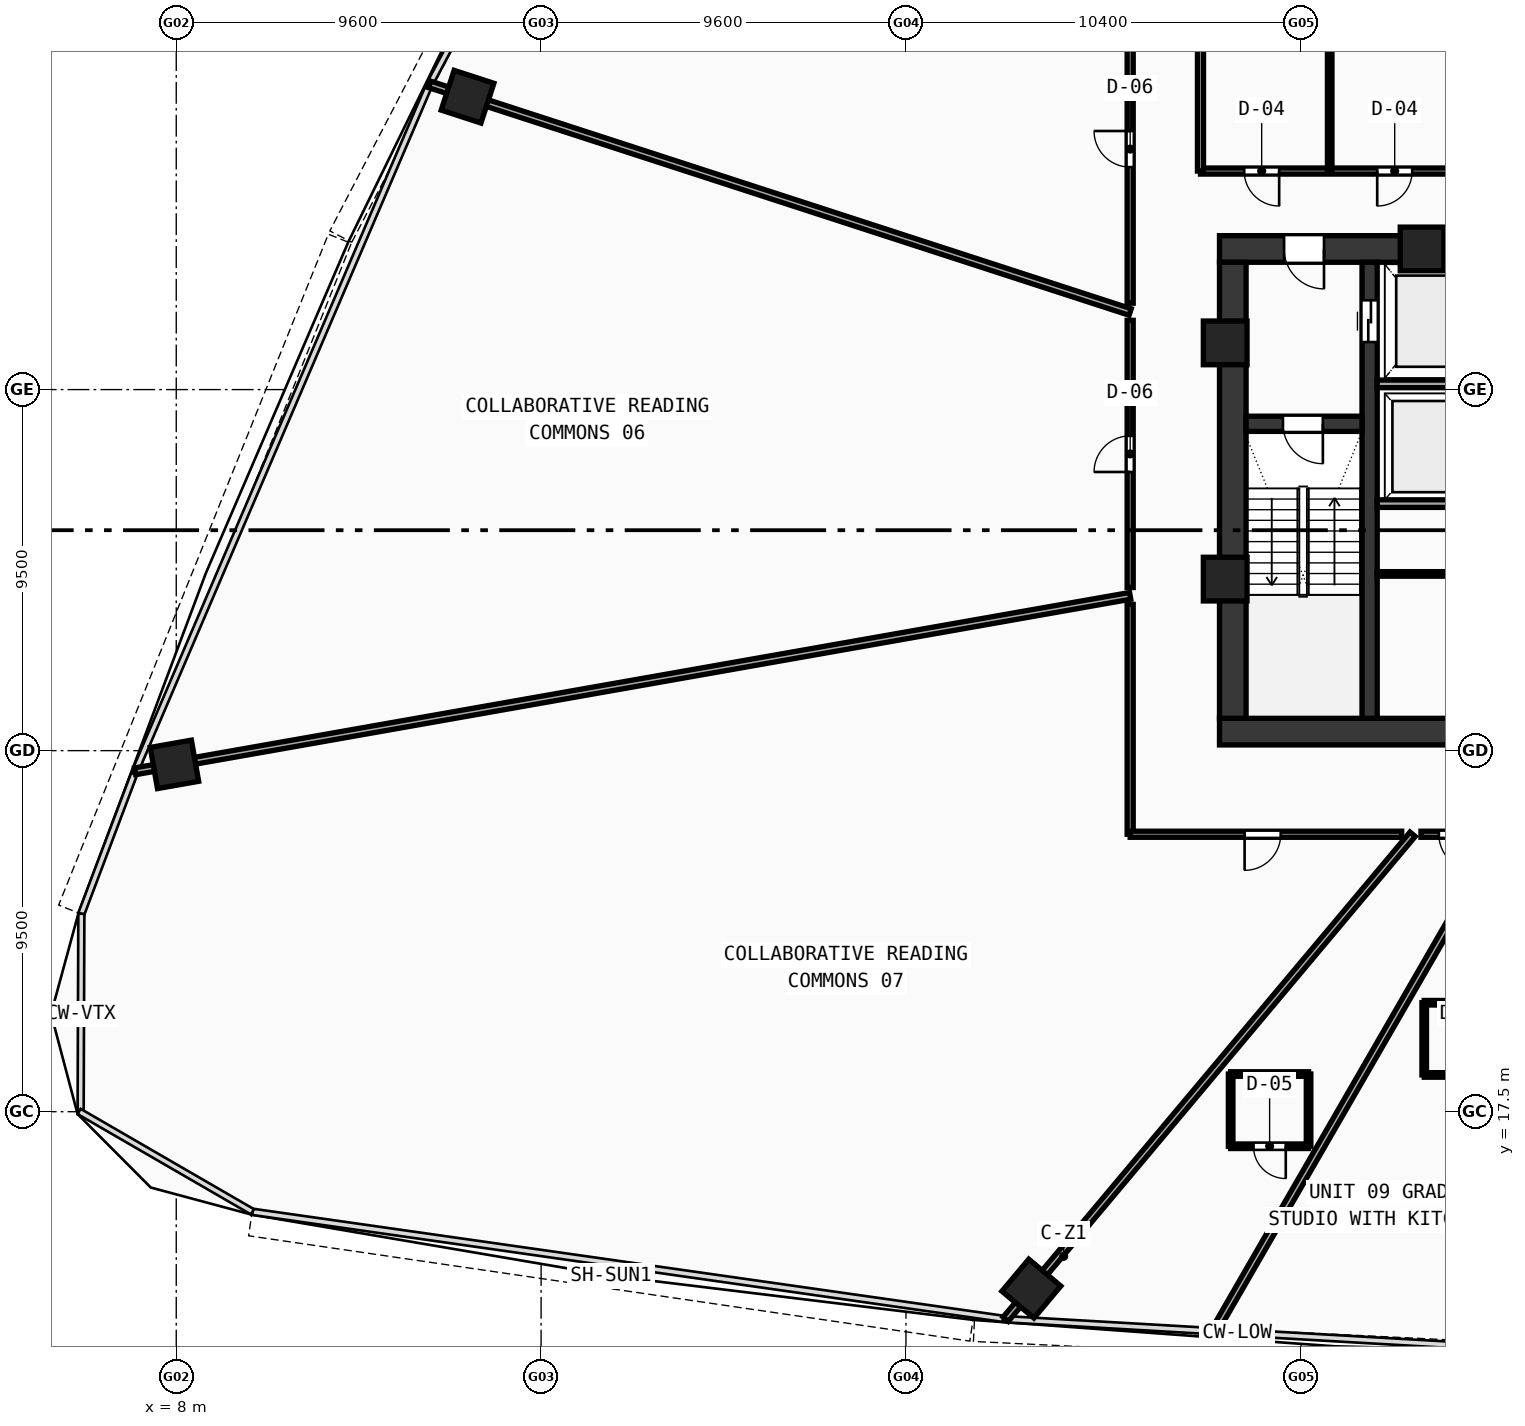
"""IFC4 building model, lengths in metres.
Left out: names, types, materials, properties, quantities, classifications, styles, units other than length and angle.
Written with IfcOpenShell. Run it as: python <this file> out.ifc"""

import sys

from ifc_helpers import new_model, si_unit, direction, frame, frame_2d, origin, origin_with_axes, origin_2d, place, context, subcontext, project, spatial, rectangle, hollow_rectangle, extrude, source, transform, mapped, element, fill, save


model = new_model("IFC4")
c1 = context("Model", 3, precision=1e-05, world=origin(), true_north=direction((0.0, 1.0)))
c2 = subcontext(c1, "Body", "Model", "MODEL_VIEW")
j1 = project(units=[si_unit("LENGTHUNIT", "METRE"), si_unit("PLANEANGLEUNIT", "RADIAN")], contexts=[c1])
p1 = place(None, origin())
s1 = spatial("IfcSite", under=j1, at=p1, CompositionType="ELEMENT")
p2 = place(p1, origin())
s2 = spatial("IfcBuilding", under=s1, at=p2, CompositionType="ELEMENT")
p3 = place(p2, frame((0.0, 0.0, 63.07)))
s3 = spatial("IfcBuildingStorey", under=s2, at=p3, CompositionType="ELEMENT", Elevation=63.07)
p4 = place(p3, frame((35.45, 27.5, 0.0), z_axis=(0.0, 0.0, 1.0), x_axis=(1.0, 0.0, 0.0)))
e1 = element("IfcWall", 1, at=p4, inside=s3, PredefinedType="SHEAR", context=c2, shape_type="SweptSolid", body=[
    extrude(rectangle(XDim=25.1, YDim=0.7, at=frame_2d((12.55, 0.0))), origin(), (0.0, 0.0, 1.0), 3.37),
])
p5 = place(p3, frame((35.45, 40.2, 0.0), z_axis=(0.0, 0.0, 1.0), x_axis=(1.0, 0.0, 0.0)))
e2 = element("IfcWall", 2, at=p5, inside=s3, PredefinedType="SHEAR", context=c2, shape_type="SweptSolid", body=[
    extrude(rectangle(XDim=11.35, YDim=0.7, at=frame_2d((5.675, 0.0))), origin(), (0.0, 0.0, 1.0), 3.37),
])
p6 = place(p5, frame((1.7, 0.0, 0.0)))
e3 = element("IfcOpeningElement", 3, at=p6, cuts=e2, PredefinedType="OPENING", context=c2, shape_type="SweptSolid", body=[
    extrude(rectangle(XDim=1.05, YDim=2.1, at=frame_2d((0.525, 1.05))), frame((0.0, 0.36, 0.0), z_axis=(0.0, -1.0, 0.0), x_axis=(1.0, 0.0, 0.0)), (0.0, 0.0, 1.0), 0.72),
])
p7 = place(p3, frame((35.8, 27.85, 0.0), z_axis=(0.0, 0.0, 1.0), x_axis=(0.0, 1.0, 0.0)))
e4 = element("IfcWall", 4, at=p7, inside=s3, PredefinedType="SHEAR", context=c2, shape_type="SweptSolid", body=[
    extrude(rectangle(XDim=12.0, YDim=0.7, at=frame_2d((6.0, 0.0))), origin(), (0.0, 0.0, 1.0), 3.37),
])
p8 = place(p3, frame((39.4, 27.85, 0.0), z_axis=(0.0, 0.0, 1.0), x_axis=(0.0, 1.0, 0.0)))
e5 = element("IfcWall", 5, at=p8, inside=s3, PredefinedType="SHEAR", context=c2, shape_type="SweptSolid", body=[
    extrude(rectangle(XDim=12.0, YDim=0.4, at=frame_2d((6.0, 0.0))), origin(), (0.0, 0.0, 1.0), 3.37),
])
p9 = place(p8, frame((9.9, 0.0, 0.0)))
e6 = element("IfcOpeningElement", 6, at=p9, cuts=e5, PredefinedType="OPENING", context=c2, shape_type="SweptSolid", body=[
    extrude(rectangle(XDim=1.1, YDim=2.1, at=frame_2d((0.55, 1.05))), frame((0.0, 0.21, 0.0), z_axis=(0.0, -1.0, 0.0), x_axis=(1.0, 0.0, 0.0)), (0.0, 0.0, 1.0), 0.42),
])
p10 = place(p3, frame((36.15, 35.6, 0.0), z_axis=(0.0, 0.0, 1.0), x_axis=(1.0, 0.0, 0.0)))
e7 = element("IfcWall", 7, at=p10, inside=s3, PredefinedType="SHEAR", context=c2, shape_type="SweptSolid", body=[
    extrude(rectangle(XDim=3.05, YDim=0.4, at=frame_2d((1.525, 0.0))), origin(), (0.0, 0.0, 1.0), 3.37),
])
p11 = place(p10, frame((0.97, 0.0, 0.0)))
e8 = element("IfcOpeningElement", 8, at=p11, cuts=e7, PredefinedType="OPENING", context=c2, shape_type="SweptSolid", body=[
    extrude(rectangle(XDim=1.05, YDim=2.1, at=frame_2d((0.525, 1.05))), frame((0.0, 0.21, 0.0), z_axis=(0.0, -1.0, 0.0), x_axis=(1.0, 0.0, 0.0)), (0.0, 0.0, 1.0), 0.42),
])
m1 = source(origin(), c2, "Body", "SweptSolid", [
    extrude(hollow_rectangle(XDim=1.15, YDim=1.15, WallThickness=0.048, at=origin_2d()), origin(), (0.0, 0.0, 1.0), 3.63),
])
for number, where, z_axis, x_axis in (
    (9, (40.781, 40.2, -0.26), (0.0, 0.0, 1.0), (1.0, 0.0, 0.0)),
    (10, (35.6, 37.729, -0.26), (0.0, 0.0, 1.0), (1.0, 0.0, 0.0)),
    (11, (35.6, 31.513, -0.26), (0.0, 0.0, 1.0), (1.0, 0.0, 0.0)),
):
    element("IfcColumn", number, at=place(p3, frame(where, z_axis=z_axis, x_axis=x_axis)), inside=s3, PredefinedType="COLUMN", context=c2, shape_type="MappedRepresentation", body=[
        mapped(m1, transform((0.0, 0.0, 0.0), scale=1.0)),
    ])
m2 = source(origin(), c2, "Body", "SweptSolid", [
    extrude(hollow_rectangle(XDim=1.1, YDim=1.1, WallThickness=0.045, at=origin_2d()), origin(), (0.0, 0.0, 1.0), 3.63),
])
for number, where, z_axis, x_axis in (
    (12, (30.5, 12.844, -0.26), (0.0, 0.0, 1.0), (0.766, -0.643, 0.0)),
    (13, (15.665, 44.206, -0.26), (0.0, 0.0, 1.0), (-0.309, -0.951, 0.0)),
    (14, (7.952, 26.638, -0.26), (0.0, 0.0, 1.0), (0.174, -0.985, 0.0)),
):
    element("IfcColumn", number, at=place(p3, frame(where, z_axis=z_axis, x_axis=x_axis)), inside=s3, PredefinedType="COLUMN", context=c2, shape_type="MappedRepresentation", body=[
        mapped(m2, transform((0.0, 0.0, 0.0), scale=1.0)),
    ])
for number, where, z_axis, x_axis in (
    (15, (39.6, 36.65, 0.0), (0.0, 0.0, 1.0), (1.0, 0.0, 0.0)),
    (16, (39.6, 33.5, 0.0), (0.0, 0.0, 1.0), (1.0, 0.0, 0.0)),
):
    element("IfcWall", number, at=place(p3, frame(where, z_axis=z_axis, x_axis=x_axis)), inside=s3, PredefinedType="SOLIDWALL", context=c2, shape_type="SweptSolid", body=[
        extrude(rectangle(XDim=2.72, YDim=0.2, at=frame_2d((1.36, 0.0))), origin(), (0.0, 0.0, 1.0), 3.37),
    ])
p12 = place(p3, frame((39.6, 31.65, 0.0), z_axis=(0.0, 0.0, 1.0), x_axis=(1.0, 0.0, 0.0)))
e17 = element("IfcWall", 17, at=p12, inside=s3, PredefinedType="PARTITIONING", context=c2, shape_type="SweptSolid", body=[
    extrude(rectangle(XDim=2.72, YDim=0.12, at=frame_2d((1.36, 0.0))), origin(), (0.0, 0.0, 1.0), 3.37),
])
p13 = place(p3, frame((34.95, 42.25, 0.0), z_axis=(0.0, 0.0, 1.0), x_axis=(1.0, 0.0, 0.0)))
e18 = element("IfcWall", 18, at=p13, inside=s3, PredefinedType="PARTITIONING", context=c2, shape_type="SweptSolid", body=[
    extrude(rectangle(XDim=8.93, YDim=0.16, at=frame_2d((4.465, 0.0))), origin(), (0.0, 0.0, 1.0), 2.67),
])
p14 = place(p13, frame((1.15, 0.0, 0.0)))
e19 = element("IfcOpeningElement", 19, at=p14, cuts=e18, PredefinedType="OPENING", context=c2, shape_type="SweptSolid", body=[
    extrude(rectangle(XDim=0.92, YDim=2.1, at=frame_2d((0.46, 1.05))), frame((0.0, 0.09, 0.0), z_axis=(0.0, -1.0, 0.0), x_axis=(1.0, 0.0, 0.0)), (0.0, 0.0, 1.0), 0.18),
])
p15 = place(p13, frame((4.65, 0.0, 0.0)))
e20 = element("IfcOpeningElement", 20, at=p15, cuts=e18, PredefinedType="OPENING", context=c2, shape_type="SweptSolid", body=[
    extrude(rectangle(XDim=0.92, YDim=2.1, at=frame_2d((0.46, 1.05))), frame((0.0, 0.09, 0.0), z_axis=(0.0, -1.0, 0.0), x_axis=(1.0, 0.0, 0.0)), (0.0, 0.0, 1.0), 0.18),
])
p16 = place(p3, frame((34.95, 42.25, 0.0), z_axis=(0.0, 0.0, 1.0), x_axis=(0.0, 1.0, 0.0)))
e21 = element("IfcWall", 21, at=p16, inside=s3, PredefinedType="PARTITIONING", context=c2, shape_type="SweptSolid", body=[
    extrude(rectangle(XDim=11.7, YDim=0.16, at=frame_2d((5.85, 0.0))), origin(), (0.0, 0.0, 1.0), 2.67),
])
p17 = place(p3, frame((38.35, 42.25, 0.0), z_axis=(0.0, 0.0, 1.0), x_axis=(0.0, 1.0, 0.0)))
e22 = element("IfcWall", 22, at=p17, inside=s3, PredefinedType="PARTITIONING", context=c2, shape_type="SweptSolid", body=[
    extrude(rectangle(XDim=11.7, YDim=0.12, at=frame_2d((5.85, 0.0))), origin(), (0.0, 0.0, 1.0), 2.67),
])
p18 = place(p3, frame((33.1, 38.541, 0.0), z_axis=(0.0, 0.0, 1.0), x_axis=(-0.951054245528, 0.309023982992, 0.0)))
e23 = element("IfcWall", 23, at=p18, inside=s3, PredefinedType="PARTITIONING", context=c2, shape_type="SweptSolid", body=[
    extrude(rectangle(XDim=19.383, YDim=0.18, at=frame_2d((9.691, 0.0))), origin(), (0.0, 0.0, 1.0), 2.67),
])
p19 = place(p3, frame((33.1, 31.073, 0.0), z_axis=(0.0, 0.0, 1.0), x_axis=(-0.984808509529, -0.173643887195, 0.0)))
e24 = element("IfcWall", 24, at=p19, inside=s3, PredefinedType="PARTITIONING", context=c2, shape_type="SweptSolid", body=[
    extrude(rectangle(XDim=26.586, YDim=0.18, at=frame_2d((13.293, 0.0))), origin(), (0.0, 0.0, 1.0), 2.67),
])
p20 = place(p3, frame((40.532, 24.8, 0.0), z_axis=(0.0, 0.0, 1.0), x_axis=(-0.642782945965, -0.766048356422, 0.0)))
e25 = element("IfcWall", 25, at=p20, inside=s3, PredefinedType="PARTITIONING", context=c2, shape_type="SweptSolid", body=[
    extrude(rectangle(XDim=16.657, YDim=0.18, at=frame_2d((8.329, 0.0))), origin(), (0.0, 0.0, 1.0), 2.67),
])
p21 = place(p3, frame((42.862, 24.8, 0.0), z_axis=(0.0, 0.0, 1.0), x_axis=(-0.499994448746, -0.866028608779, 0.0)))
e26 = element("IfcWall", 26, at=p21, inside=s3, PredefinedType="PARTITIONING", context=c2, shape_type="SweptSolid", body=[
    extrude(rectangle(XDim=15.099, YDim=0.18, at=frame_2d((7.55, 0.0))), origin(), (0.0, 0.0, 1.0), 2.67),
])
p22 = place(p3, frame((33.1, 24.8, 0.0), z_axis=(0.0, 0.0, 1.0), x_axis=(0.0, 1.0, 0.0)))
e27 = element("IfcWall", 27, at=p22, inside=s3, PredefinedType="PARTITIONING", context=c2, shape_type="SweptSolid", body=[
    extrude(rectangle(XDim=6.049, YDim=0.16, at=frame_2d((3.025, 0.0))), origin(), (0.0, 0.0, 1.0), 2.97),
])
p23 = place(p3, frame((33.1, 31.292, 0.0), z_axis=(0.0, 0.0, 1.0), x_axis=(0.0, 1.0, 0.0)))
e28 = element("IfcWall", 28, at=p23, inside=s3, PredefinedType="PARTITIONING", context=c2, shape_type="SweptSolid", body=[
    extrude(rectangle(XDim=7.029, YDim=0.16, at=frame_2d((3.515, 0.0))), origin(), (0.0, 0.0, 1.0), 3.37),
])
p24 = place(p23, frame((3.04, 0.0, 0.0)))
e29 = element("IfcOpeningElement", 29, at=p24, cuts=e28, PredefinedType="OPENING", context=c2, shape_type="SweptSolid", body=[
    extrude(rectangle(XDim=0.95, YDim=2.1, at=frame_2d((0.475, 1.05))), frame((0.0, 0.09, 0.0), z_axis=(0.0, -1.0, 0.0), x_axis=(1.0, 0.0, 0.0)), (0.0, 0.0, 1.0), 0.18),
])
p25 = place(p3, frame((33.1, 38.773, 0.0), z_axis=(0.0, 0.0, 1.0), x_axis=(0.0, 1.0, 0.0)))
e30 = element("IfcWall", 30, at=p25, inside=s3, PredefinedType="PARTITIONING", context=c2, shape_type="SweptSolid", body=[
    extrude(rectangle(XDim=8.124, YDim=0.16, at=frame_2d((4.062, 0.0))), origin(), (0.0, 0.0, 1.0), 2.67),
])
p26 = place(p25, frame((3.581, 0.0, 0.0)))
e31 = element("IfcOpeningElement", 31, at=p26, cuts=e30, PredefinedType="OPENING", context=c2, shape_type="SweptSolid", body=[
    extrude(rectangle(XDim=0.95, YDim=2.1, at=frame_2d((0.475, 1.05))), frame((0.0, 0.09, 0.0), z_axis=(0.0, -1.0, 0.0), x_axis=(1.0, 0.0, 0.0)), (0.0, 0.0, 1.0), 0.18),
])
p27 = place(p3, frame((42.608, 24.8, 0.0), z_axis=(0.0, 0.0, 1.0), x_axis=(-1.0, 0.0, 0.0)))
e32 = element("IfcWall", 32, at=p27, inside=s3, PredefinedType="PARTITIONING", context=c2, shape_type="SweptSolid", body=[
    extrude(rectangle(XDim=1.856, YDim=0.16, at=frame_2d((0.928, 0.0))), origin(), (0.0, 0.0, 1.0), 2.67),
])
p28 = place(p27, frame((0.436, 0.0, 0.0)))
e33 = element("IfcOpeningElement", 33, at=p28, cuts=e32, PredefinedType="OPENING", context=c2, shape_type="SweptSolid", body=[
    extrude(rectangle(XDim=0.95, YDim=2.1, at=frame_2d((0.475, 1.05))), frame((0.0, 0.09, 0.0), z_axis=(0.0, -1.0, 0.0), x_axis=(1.0, 0.0, 0.0)), (0.0, 0.0, 1.0), 0.18),
])
p29 = place(p3, frame((40.245, 24.8, 0.0), z_axis=(0.0, 0.0, 1.0), x_axis=(-1.0, 0.0, 0.0)))
e34 = element("IfcWall", 34, at=p29, inside=s3, PredefinedType="PARTITIONING", context=c2, shape_type="SweptSolid", body=[
    extrude(rectangle(XDim=7.145, YDim=0.16, at=frame_2d((3.572, 0.0))), origin(), (0.0, 0.0, 1.0), 2.97),
])
p30 = place(p29, frame((3.184, 0.0, 0.0)))
e35 = element("IfcOpeningElement", 35, at=p30, cuts=e34, PredefinedType="OPENING", context=c2, shape_type="SweptSolid", body=[
    extrude(rectangle(XDim=0.95, YDim=2.1, at=frame_2d((0.475, 1.05))), frame((0.0, 0.09, 0.0), z_axis=(0.0, -1.0, 0.0), x_axis=(1.0, 0.0, 0.0)), (0.0, 0.0, 1.0), 0.18),
])
p31 = place(p3, frame((35.744, 16.591, 0.0), z_axis=(0.0, 0.0, 1.0), x_axis=(1.0, 0.0, 0.0)))
e36 = element("IfcWall", 36, at=p31, inside=s3, PredefinedType="PARTITIONING", context=c2, shape_type="SweptSolid", body=[
    extrude(rectangle(XDim=2.05, YDim=0.12, at=frame_2d((1.025, 0.0))), origin(), (0.0, 0.0, 1.0), 3.37),
])
p32 = place(p31, frame((0.6, 0.0, 0.0)))
e37 = element("IfcOpeningElement", 37, at=p32, cuts=e36, PredefinedType="OPENING", context=c2, shape_type="SweptSolid", body=[
    extrude(rectangle(XDim=0.85, YDim=2.1, at=frame_2d((0.425, 1.05))), frame((0.0, 0.07, 0.0), z_axis=(0.0, -1.0, 0.0), x_axis=(1.0, 0.0, 0.0)), (0.0, 0.0, 1.0), 0.14),
])
p33 = place(p3, frame((37.794, 16.591, 0.0), z_axis=(0.0, 0.0, 1.0), x_axis=(0.0, 1.0, 0.0)))
e38 = element("IfcWall", 38, at=p33, inside=s3, PredefinedType="PARTITIONING", context=c2, shape_type="SweptSolid", body=[
    extrude(rectangle(XDim=1.9, YDim=0.12, at=frame_2d((0.95, 0.0))), origin(), (0.0, 0.0, 1.0), 2.97),
])
p34 = place(p3, frame((37.794, 18.491, 0.0), z_axis=(0.0, 0.0, 1.0), x_axis=(-1.0, 0.0, 0.0)))
e39 = element("IfcWall", 39, at=p34, inside=s3, PredefinedType="PARTITIONING", context=c2, shape_type="SweptSolid", body=[
    extrude(rectangle(XDim=2.05, YDim=0.12, at=frame_2d((1.025, 0.0))), origin(), (0.0, 0.0, 1.0), 3.37),
])
p35 = place(p3, frame((35.744, 18.491, 0.0), z_axis=(0.0, 0.0, 1.0), x_axis=(0.0, -1.0, 0.0)))
e40 = element("IfcWall", 40, at=p35, inside=s3, PredefinedType="PARTITIONING", context=c2, shape_type="SweptSolid", body=[
    extrude(rectangle(XDim=1.9, YDim=0.12, at=frame_2d((0.95, 0.0))), origin(), (0.0, 0.0, 1.0), 2.97),
])
p36 = place(p3, frame((40.837, 18.467, 0.0), z_axis=(0.0, 0.0, 1.0), x_axis=(1.0, 0.0, 0.0)))
e41 = element("IfcWall", 41, at=p36, inside=s3, PredefinedType="PARTITIONING", context=c2, shape_type="SweptSolid", body=[
    extrude(rectangle(XDim=2.05, YDim=0.12, at=frame_2d((1.025, 0.0))), origin(), (0.0, 0.0, 1.0), 3.37),
])
p37 = place(p36, frame((0.6, 0.0, 0.0)))
e42 = element("IfcOpeningElement", 42, at=p37, cuts=e41, PredefinedType="OPENING", context=c2, shape_type="SweptSolid", body=[
    extrude(rectangle(XDim=0.85, YDim=2.1, at=frame_2d((0.425, 1.05))), frame((0.0, 0.07, 0.0), z_axis=(0.0, -1.0, 0.0), x_axis=(1.0, 0.0, 0.0)), (0.0, 0.0, 1.0), 0.14),
])
p38 = place(p3, frame((42.887, 20.367, 0.0), z_axis=(0.0, 0.0, 1.0), x_axis=(-1.0, 0.0, 0.0)))
e43 = element("IfcWall", 43, at=p38, inside=s3, PredefinedType="PARTITIONING", context=c2, shape_type="SweptSolid", body=[
    extrude(rectangle(XDim=2.05, YDim=0.12, at=frame_2d((1.025, 0.0))), origin(), (0.0, 0.0, 1.0), 3.37),
])
p39 = place(p3, frame((40.837, 20.367, 0.0), z_axis=(0.0, 0.0, 1.0), x_axis=(0.0, -1.0, 0.0)))
e44 = element("IfcWall", 44, at=p39, inside=s3, PredefinedType="PARTITIONING", context=c2, shape_type="SweptSolid", body=[
    extrude(rectangle(XDim=1.9, YDim=0.12, at=frame_2d((0.95, 0.0))), origin(), (0.0, 0.0, 1.0), 3.37),
])
m3 = source(origin(), c2, "Body", "SweptSolid", [
    extrude(rectangle(XDim=1.05, YDim=2.1, at=frame_2d((0.525, 1.05))), frame((0.0, 0.025, 0.0), z_axis=(0.0, -1.0, 0.0), x_axis=(1.0, 0.0, 0.0)), (0.0, 0.0, 1.0), 0.05),
])
p40 = place(p11, frame((1.05, 0.0, 0.0), z_axis=(0.0, 0.0, 1.0), x_axis=(-1.0, 0.0, 0.0)))
e45 = element("IfcDoor", 45, at=p40, inside=s3, OperationType="SINGLE_SWING_LEFT", PredefinedType="DOOR", context=c2, shape_type="MappedRepresentation", body=[
    mapped(m3, transform((0.0, 0.0, 0.0), scale=1.0)),
])
fill(e8, e45)
p41 = place(p6, frame((1.05, 0.0, 0.0), z_axis=(0.0, 0.0, 1.0), x_axis=(-1.0, 0.0, 0.0)))
e46 = element("IfcDoor", 46, at=p41, inside=s3, OperationType="SINGLE_SWING_LEFT", PredefinedType="DOOR", context=c2, shape_type="MappedRepresentation", body=[
    mapped(m3, transform((0.0, 0.0, 0.0), scale=1.0)),
])
fill(e3, e46)
m4 = source(origin(), c2, "Body", "SweptSolid", [
    extrude(rectangle(XDim=1.1, YDim=2.1, at=frame_2d((0.55, 1.05))), frame((0.0, 0.025, 0.0), z_axis=(0.0, -1.0, 0.0), x_axis=(1.0, 0.0, 0.0)), (0.0, 0.0, 1.0), 0.05),
])
p42 = place(p9, frame((1.1, 0.0, 0.0), z_axis=(0.0, 0.0, 1.0), x_axis=(-1.0, 0.0, 0.0)))
e47 = element("IfcDoor", 47, at=p42, inside=s3, OperationType="DOUBLE_DOOR_SLIDING", PredefinedType="DOOR", context=c2, shape_type="MappedRepresentation", body=[
    mapped(m4, transform((0.0, 0.0, 0.0), scale=1.0)),
])
fill(e6, e47)
m5 = source(origin(), c2, "Body", "SweptSolid", [
    extrude(rectangle(XDim=0.92, YDim=2.1, at=frame_2d((0.46, 1.05))), frame((0.0, 0.025, 0.0), z_axis=(0.0, -1.0, 0.0), x_axis=(1.0, 0.0, 0.0)), (0.0, 0.0, 1.0), 0.05),
])
p43 = place(p14, frame((0.92, 0.0, 0.0), z_axis=(0.0, 0.0, 1.0), x_axis=(-1.0, 0.0, 0.0)))
e48 = element("IfcDoor", 48, at=p43, inside=s3, OperationType="SINGLE_SWING_LEFT", PredefinedType="DOOR", context=c2, shape_type="MappedRepresentation", body=[
    mapped(m5, transform((0.0, 0.0, 0.0), scale=1.0)),
])
fill(e19, e48)
p44 = place(p15, frame((0.92, 0.0, 0.0), z_axis=(0.0, 0.0, 1.0), x_axis=(-1.0, 0.0, 0.0)))
e49 = element("IfcDoor", 49, at=p44, inside=s3, OperationType="SINGLE_SWING_RIGHT", PredefinedType="DOOR", context=c2, shape_type="MappedRepresentation", body=[
    mapped(m5, transform((0.0, 0.0, 0.0), scale=1.0)),
])
fill(e20, e49)
m6 = source(origin(), c2, "Body", "SweptSolid", [
    extrude(rectangle(XDim=0.95, YDim=2.1, at=frame_2d((0.475, 1.05))), frame((0.0, 0.025, 0.0), z_axis=(0.0, -1.0, 0.0), x_axis=(1.0, 0.0, 0.0)), (0.0, 0.0, 1.0), 0.05),
])
p45 = place(p26, origin_with_axes())
e50 = element("IfcDoor", 50, at=p45, inside=s3, OperationType="SINGLE_SWING_RIGHT", PredefinedType="DOOR", context=c2, shape_type="MappedRepresentation", body=[
    mapped(m6, transform((0.0, 0.0, 0.0), scale=1.0)),
])
fill(e31, e50)
p46 = place(p24, origin_with_axes())
e51 = element("IfcDoor", 51, at=p46, inside=s3, OperationType="SINGLE_SWING_LEFT", PredefinedType="DOOR", context=c2, shape_type="MappedRepresentation", body=[
    mapped(m6, transform((0.0, 0.0, 0.0), scale=1.0)),
])
fill(e29, e51)
p47 = place(p30, origin_with_axes())
e52 = element("IfcDoor", 52, at=p47, inside=s3, OperationType="SINGLE_SWING_RIGHT", PredefinedType="DOOR", context=c2, shape_type="MappedRepresentation", body=[
    mapped(m6, transform((0.0, 0.0, 0.0), scale=1.0)),
])
fill(e35, e52)
p48 = place(p28, origin_with_axes())
e53 = element("IfcDoor", 53, at=p48, inside=s3, OperationType="SINGLE_SWING_LEFT", PredefinedType="DOOR", context=c2, shape_type="MappedRepresentation", body=[
    mapped(m6, transform((0.0, 0.0, 0.0), scale=1.0)),
])
fill(e33, e53)
m7 = source(origin(), c2, "Body", "SweptSolid", [
    extrude(rectangle(XDim=0.85, YDim=2.1, at=frame_2d((0.425, 1.05))), frame((0.0, 0.025, 0.0), z_axis=(0.0, -1.0, 0.0), x_axis=(1.0, 0.0, 0.0)), (0.0, 0.0, 1.0), 0.05),
])
p49 = place(p32, frame((0.85, 0.0, 0.0), z_axis=(0.0, 0.0, 1.0), x_axis=(-1.0, 0.0, 0.0)))
e54 = element("IfcDoor", 54, at=p49, inside=s3, OperationType="SINGLE_SWING_LEFT", PredefinedType="DOOR", context=c2, shape_type="MappedRepresentation", body=[
    mapped(m7, transform((0.0, 0.0, 0.0), scale=1.0)),
])
fill(e37, e54)
save(model, sys.argv[1])
